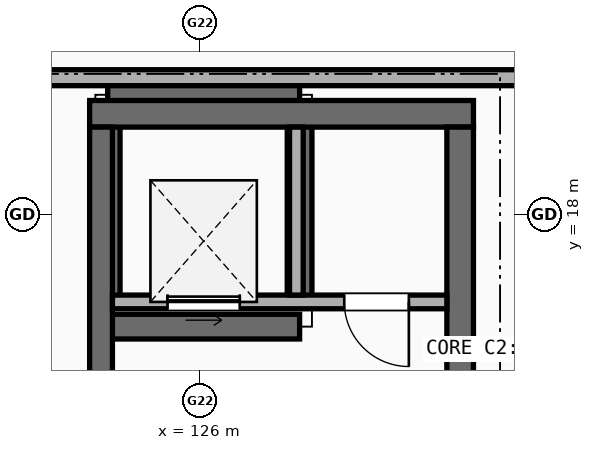
"""IFC4 building model, lengths in metres.
Left out: names, types, materials, properties, quantities, classifications, styles, units other than length and angle.
Written with IfcOpenShell. Run it as: python <this file> out.ifc"""

import sys

from ifc_helpers import new_model, si_unit, direction, frame, frame_2d, origin, place, context, subcontext, project, spatial, rectangle, extrude, element, fill, save


model = new_model("IFC4")
c1 = context("Model", 3, precision=1e-05, world=origin(), true_north=direction((0.0, 1.0)))
c2 = subcontext(c1, "Body", "Model", "MODEL_VIEW")
j1 = project(units=[si_unit("LENGTHUNIT", "METRE"), si_unit("PLANEANGLEUNIT", "RADIAN")], contexts=[c1])
p1 = place(None, origin())
s1 = spatial("IfcSite", under=j1, at=p1, CompositionType="ELEMENT")
p2 = place(p1, origin())
s2 = spatial("IfcBuilding", under=s1, at=p2, CompositionType="ELEMENT")
p3 = place(p2, frame((0.0, 0.0, -4.5)))
s3 = spatial("IfcBuildingStorey", under=s2, at=p3, CompositionType="ELEMENT", Elevation=-4.5)
p4 = place(p3, frame((124.788, 16.525, -1.1), z_axis=(0.0, 0.0, 1.0), x_axis=(1.0, 0.0, 0.0)))
e1 = element("IfcWall", 1, at=p4, inside=s3, PredefinedType="SHEAR", context=c2, shape_type="SweptSolid", body=[
    extrude(rectangle(XDim=2.525, YDim=0.325, at=frame_2d((1.262, 0.0))), origin(), (0.0, 0.0, 1.0), 1.1),
])
p5 = place(p3, frame((127.312, 16.85, -1.1), z_axis=(0.0, 0.0, 1.0), x_axis=(0.0, 1.0, 0.0)))
e2 = element("IfcWall", 2, at=p5, inside=s3, PredefinedType="SHEAR", context=c2, shape_type="SweptSolid", body=[
    extrude(rectangle(XDim=2.4, YDim=0.325, at=frame_2d((1.2, 0.0))), origin(), (0.0, 0.0, 1.0), 1.1),
])
p6 = place(p3, frame((127.312, 19.575, -1.1), z_axis=(0.0, 0.0, 1.0), x_axis=(-1.0, 0.0, 0.0)))
e3 = element("IfcWall", 3, at=p6, inside=s3, PredefinedType="SHEAR", context=c2, shape_type="SweptSolid", body=[
    extrude(rectangle(XDim=2.525, YDim=0.325, at=frame_2d((1.262, 0.0))), origin(), (0.0, 0.0, 1.0), 1.1),
])
p7 = place(p3, frame((124.788, 19.25, -1.1), z_axis=(0.0, 0.0, 1.0), x_axis=(0.0, -1.0, 0.0)))
e4 = element("IfcWall", 4, at=p7, inside=s3, PredefinedType="SHEAR", context=c2, shape_type="SweptSolid", body=[
    extrude(rectangle(XDim=2.4, YDim=0.325, at=frame_2d((1.2, 0.0))), origin(), (0.0, 0.0, 1.0), 1.1),
])
p8 = place(p3, frame((129.6, 19.325, 0.0), z_axis=(0.0, 0.0, 1.0), x_axis=(-1.0, 0.0, 0.0)))
e5 = element("IfcWall", 5, at=p8, inside=s3, PredefinedType="SHEAR", context=c2, shape_type="SweptSolid", body=[
    extrude(rectangle(XDim=5.05, YDim=0.35, at=frame_2d((2.525, 0.0))), origin(), (0.0, 0.0, 1.0), 4.215),
])
p9 = place(p3, frame((129.425, 12.75, 0.0), z_axis=(0.0, 0.0, 1.0), x_axis=(0.0, 1.0, 0.0)))
e6 = element("IfcWall", 6, at=p9, inside=s3, PredefinedType="SHEAR", context=c2, shape_type="SweptSolid", body=[
    extrude(rectangle(XDim=6.4, YDim=0.35, at=frame_2d((3.2, 0.0))), origin(), (0.0, 0.0, 1.0), 4.215),
])
p10 = place(p3, frame((124.7, 15.7, 0.0), z_axis=(0.0, 0.0, 1.0), x_axis=(0.0, 1.0, 0.0)))
e7 = element("IfcWall", 7, at=p10, inside=s3, PredefinedType="SHEAR", context=c2, shape_type="SweptSolid", body=[
    extrude(rectangle(XDim=3.45, YDim=0.3, at=frame_2d((1.725, 0.0))), origin(), (0.0, 0.0, 1.0), 4.215),
])
p11 = place(p3, frame((124.85, 16.85, 0.0), z_axis=(0.0, 0.0, 1.0), x_axis=(1.0, 0.0, 0.0)))
e8 = element("IfcWall", 8, at=p11, inside=s3, PredefinedType="SOLIDWALL", context=c2, shape_type="SweptSolid", body=[
    extrude(rectangle(XDim=4.4, YDim=0.18, at=frame_2d((2.2, 0.0))), origin(), (0.0, 0.0, 1.0), 4.215),
])
p12 = place(p11, frame((0.725, 0.0, 0.0)))
e9 = element("IfcOpeningElement", 9, at=p12, cuts=e8, PredefinedType="OPENING", context=c2, shape_type="SweptSolid", body=[
    extrude(rectangle(XDim=0.95, YDim=2.15, at=frame_2d((0.475, 1.075))), frame((0.0, 0.1, 0.0), z_axis=(0.0, -1.0, 0.0), x_axis=(1.0, 0.0, 0.0)), (0.0, 0.0, 1.0), 0.2),
])
p13 = place(p11, frame((3.05, 0.0, 0.0)))
e10 = element("IfcOpeningElement", 10, at=p13, cuts=e8, PredefinedType="OPENING", context=c2, shape_type="SweptSolid", body=[
    extrude(rectangle(XDim=0.85, YDim=2.1, at=frame_2d((0.425, 1.05))), frame((0.0, 0.1, 0.0), z_axis=(0.0, -1.0, 0.0), x_axis=(1.0, 0.0, 0.0)), (0.0, 0.0, 1.0), 0.2),
])
p14 = place(p3, frame((127.27, 16.94, 0.0), z_axis=(0.0, 0.0, 1.0), x_axis=(0.0, 1.0, 0.0)))
e11 = element("IfcWall", 11, at=p14, inside=s3, PredefinedType="SOLIDWALL", context=c2, shape_type="SweptSolid", body=[
    extrude(rectangle(XDim=2.21, YDim=0.18, at=frame_2d((1.105, 0.0))), origin(), (0.0, 0.0, 1.0), 4.215),
])
p15 = place(p3, frame((103.54, 19.8, 0.0), z_axis=(0.0, 0.0, 1.0), x_axis=(1.0, 0.0, 0.0)))
e12 = element("IfcWall", 12, at=p15, inside=s3, PredefinedType="SOLIDWALL", context=c2, shape_type="SweptSolid", body=[
    extrude(rectangle(XDim=28.42, YDim=0.21, at=frame_2d((14.21, 0.0))), origin(), (0.0, 0.0, 1.0), 2.897),
])
p16 = place(p12, origin())
e13 = element("IfcDoor", 13, at=p16, inside=s3, OperationType="SLIDING_TO_LEFT", PredefinedType="DOOR", context=c2, shape_type="SweptSolid", body=[
    extrude(rectangle(XDim=0.95, YDim=2.15, at=frame_2d((0.475, 1.075))), frame((0.0, 0.025, 0.0), z_axis=(0.0, -1.0, 0.0), x_axis=(1.0, 0.0, 0.0)), (0.0, 0.0, 1.0), 0.05),
])
fill(e9, e13)
p17 = place(p13, frame((0.85, 0.0, 0.0), z_axis=(0.0, 0.0, 1.0), x_axis=(-1.0, 0.0, 0.0)))
e14 = element("IfcDoor", 14, at=p17, inside=s3, OperationType="SINGLE_SWING_RIGHT", PredefinedType="DOOR", context=c2, shape_type="SweptSolid", body=[
    extrude(rectangle(XDim=0.85, YDim=2.1, at=frame_2d((0.425, 1.05))), frame((0.0, 0.025, 0.0), z_axis=(0.0, -1.0, 0.0), x_axis=(1.0, 0.0, 0.0)), (0.0, 0.0, 1.0), 0.05),
])
fill(e10, e14)
save(model, sys.argv[1])
